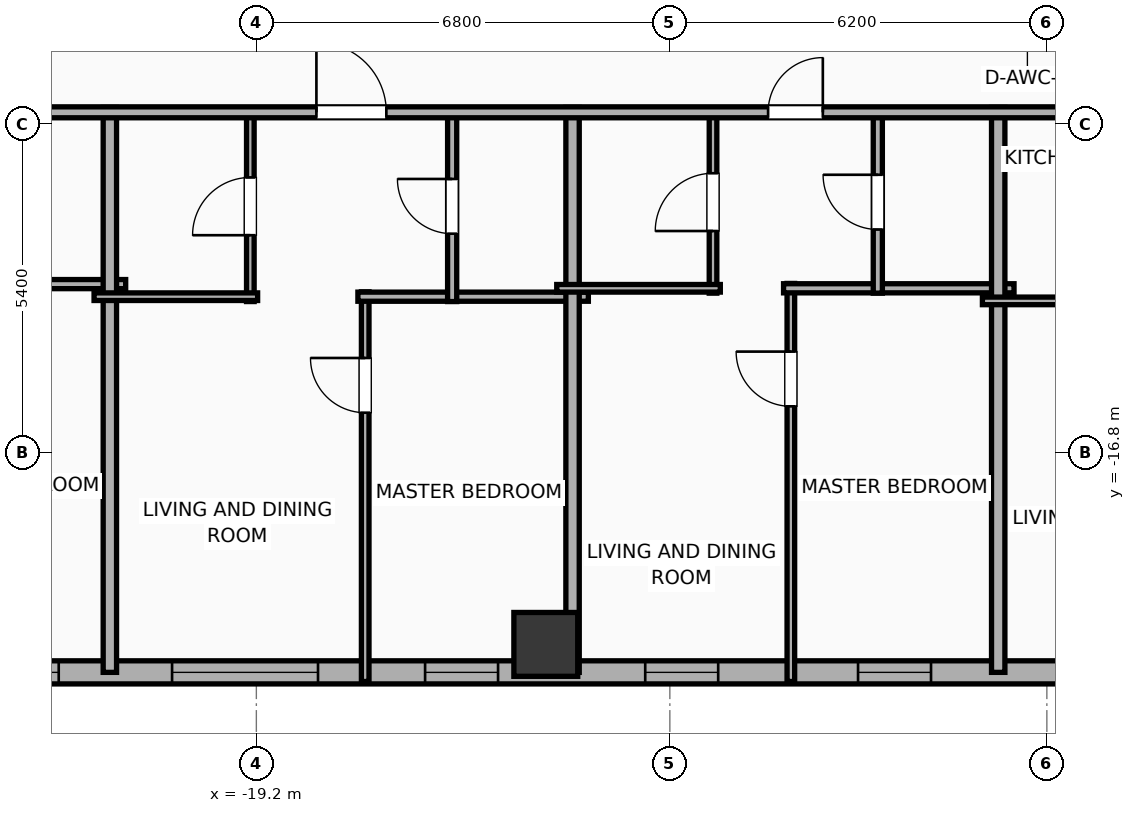
"""IFC4 building model, lengths in metres.
Left out: names, types, materials, properties, quantities, classifications, styles, units other than length and angle.
Written with IfcOpenShell. Run it as: python <this file> out.ifc"""

import sys

from ifc_helpers import new_model, si_unit, direction, frame, frame_2d, origin, origin_2d, place, context, subcontext, project, spatial, rectangle, hollow_rectangle, extrude, element, fill, save


model = new_model("IFC4")
c1 = context("Model", 3, precision=1e-05, world=origin(), true_north=direction((0.0, 1.0)))
c2 = subcontext(c1, "Body", "Model", "MODEL_VIEW")
j1 = project(units=[si_unit("LENGTHUNIT", "METRE"), si_unit("PLANEANGLEUNIT", "RADIAN")], contexts=[c1])
p1 = place(None, origin())
s1 = spatial("IfcSite", under=j1, at=p1, CompositionType="ELEMENT")
p2 = place(p1, origin())
s2 = spatial("IfcBuilding", under=s1, at=p2, CompositionType="ELEMENT")
p3 = place(p2, frame((0.0, 0.0, 120.9)))
s3 = spatial("IfcBuildingStorey", under=s2, at=p3, CompositionType="ELEMENT", Elevation=120.9)
p4 = place(p3, frame((-14.44, -19.95, 0.0), z_axis=(0.0, 0.0, 1.0), x_axis=(1.0, 0.0, 0.0)))
e1 = element("IfcColumn", 1, at=p4, inside=s3, PredefinedType="COLUMN", context=c2, shape_type="SweptSolid", body=[
    extrude(hollow_rectangle(XDim=1.05, YDim=1.05, WallThickness=0.036, at=origin_2d()), origin(), (0.0, 0.0, 1.0), 3.9),
])
p5 = place(p3, frame((29.381, -20.41, 0.0), z_axis=(0.0, 0.0, 1.0), x_axis=(-1.0, 0.0, 0.0)))
e2 = element("IfcWall", 2, at=p5, inside=s3, PredefinedType="ELEMENTEDWALL", context=c2, shape_type="SweptSolid", body=[
    extrude(rectangle(XDim=54.763, YDim=0.38, at=frame_2d((27.381, 0.0))), origin(), (0.0, 0.0, 1.0), 3.65),
])
p6 = place(p5, frame((5.645, 0.0, 0.75)))
e3 = element("IfcOpeningElement", 3, at=p6, cuts=e2, PredefinedType="OPENING", context=c2, shape_type="SweptSolid", body=[
    extrude(rectangle(XDim=2.4, YDim=2.1, at=frame_2d((1.2, 1.05))), frame((0.0, 0.2, 0.0), z_axis=(0.0, -1.0, 0.0), x_axis=(1.0, 0.0, 0.0)), (0.0, 0.0, 1.0), 0.4),
])
p7 = place(p5, frame((47.567, 0.0, 0.75)))
e4 = element("IfcOpeningElement", 4, at=p7, cuts=e2, PredefinedType="OPENING", context=c2, shape_type="SweptSolid", body=[
    extrude(rectangle(XDim=2.4, YDim=2.1, at=frame_2d((1.2, 1.05))), frame((0.0, 0.2, 0.0), z_axis=(0.0, -1.0, 0.0), x_axis=(1.0, 0.0, 0.0)), (0.0, 0.0, 1.0), 0.4),
])
p8 = place(p5, frame((51.831, 0.0, 0.75)))
e5 = element("IfcOpeningElement", 5, at=p8, cuts=e2, PredefinedType="OPENING", context=c2, shape_type="SweptSolid", body=[
    extrude(rectangle(XDim=1.2, YDim=2.05, at=frame_2d((0.6, 1.025))), frame((0.0, 0.2, 0.0), z_axis=(0.0, -1.0, 0.0), x_axis=(1.0, 0.0, 0.0)), (0.0, 0.0, 1.0), 0.4),
])
p9 = place(p5, frame((44.606, 0.0, 0.75)))
e6 = element("IfcOpeningElement", 6, at=p9, cuts=e2, PredefinedType="OPENING", context=c2, shape_type="SweptSolid", body=[
    extrude(rectangle(XDim=1.2, YDim=2.05, at=frame_2d((0.6, 1.025))), frame((0.0, 0.2, 0.0), z_axis=(0.0, -1.0, 0.0), x_axis=(1.0, 0.0, 0.0)), (0.0, 0.0, 1.0), 0.4),
])
p10 = place(p5, frame((40.986, 0.0, 0.75)))
e7 = element("IfcOpeningElement", 7, at=p10, cuts=e2, PredefinedType="OPENING", context=c2, shape_type="SweptSolid", body=[
    extrude(rectangle(XDim=1.2, YDim=2.05, at=frame_2d((0.6, 1.025))), frame((0.0, 0.2, 0.0), z_axis=(0.0, -1.0, 0.0), x_axis=(1.0, 0.0, 0.0)), (0.0, 0.0, 1.0), 0.4),
])
p11 = place(p5, frame((37.486, 0.0, 0.75)))
e8 = element("IfcOpeningElement", 8, at=p11, cuts=e2, PredefinedType="OPENING", context=c2, shape_type="SweptSolid", body=[
    extrude(rectangle(XDim=1.2, YDim=2.05, at=frame_2d((0.6, 1.025))), frame((0.0, 0.2, 0.0), z_axis=(0.0, -1.0, 0.0), x_axis=(1.0, 0.0, 0.0)), (0.0, 0.0, 1.0), 0.4),
])
p12 = place(p5, frame((33.986, 0.0, 0.75)))
e9 = element("IfcOpeningElement", 9, at=p12, cuts=e2, PredefinedType="OPENING", context=c2, shape_type="SweptSolid", body=[
    extrude(rectangle(XDim=1.2, YDim=2.05, at=frame_2d((0.6, 1.025))), frame((0.0, 0.2, 0.0), z_axis=(0.0, -1.0, 0.0), x_axis=(1.0, 0.0, 0.0)), (0.0, 0.0, 1.0), 0.4),
])
p13 = place(p5, frame((30.486, 0.0, 0.75)))
e10 = element("IfcOpeningElement", 10, at=p13, cuts=e2, PredefinedType="OPENING", context=c2, shape_type="SweptSolid", body=[
    extrude(rectangle(XDim=1.2, YDim=2.05, at=frame_2d((0.6, 1.025))), frame((0.0, 0.2, 0.0), z_axis=(0.0, -1.0, 0.0), x_axis=(1.0, 0.0, 0.0)), (0.0, 0.0, 1.0), 0.4),
])
p14 = place(p5, frame((26.986, 0.0, 0.75)))
e11 = element("IfcOpeningElement", 11, at=p14, cuts=e2, PredefinedType="OPENING", context=c2, shape_type="SweptSolid", body=[
    extrude(rectangle(XDim=1.2, YDim=2.05, at=frame_2d((0.6, 1.025))), frame((0.0, 0.2, 0.0), z_axis=(0.0, -1.0, 0.0), x_axis=(1.0, 0.0, 0.0)), (0.0, 0.0, 1.0), 0.4),
])
p15 = place(p5, frame((23.486, 0.0, 0.75)))
e12 = element("IfcOpeningElement", 12, at=p15, cuts=e2, PredefinedType="OPENING", context=c2, shape_type="SweptSolid", body=[
    extrude(rectangle(XDim=1.2, YDim=2.05, at=frame_2d((0.6, 1.025))), frame((0.0, 0.2, 0.0), z_axis=(0.0, -1.0, 0.0), x_axis=(1.0, 0.0, 0.0)), (0.0, 0.0, 1.0), 0.4),
])
p16 = place(p5, frame((19.986, 0.0, 0.75)))
e13 = element("IfcOpeningElement", 13, at=p16, cuts=e2, PredefinedType="OPENING", context=c2, shape_type="SweptSolid", body=[
    extrude(rectangle(XDim=1.2, YDim=2.05, at=frame_2d((0.6, 1.025))), frame((0.0, 0.2, 0.0), z_axis=(0.0, -1.0, 0.0), x_axis=(1.0, 0.0, 0.0)), (0.0, 0.0, 1.0), 0.4),
])
p17 = place(p5, frame((16.486, 0.0, 0.75)))
e14 = element("IfcOpeningElement", 14, at=p17, cuts=e2, PredefinedType="OPENING", context=c2, shape_type="SweptSolid", body=[
    extrude(rectangle(XDim=1.2, YDim=2.05, at=frame_2d((0.6, 1.025))), frame((0.0, 0.2, 0.0), z_axis=(0.0, -1.0, 0.0), x_axis=(1.0, 0.0, 0.0)), (0.0, 0.0, 1.0), 0.4),
])
p18 = place(p5, frame((11.698, 0.0, 0.75)))
e15 = element("IfcOpeningElement", 15, at=p18, cuts=e2, PredefinedType="OPENING", context=c2, shape_type="SweptSolid", body=[
    extrude(rectangle(XDim=1.2, YDim=2.05, at=frame_2d((0.6, 1.025))), frame((0.0, 0.2, 0.0), z_axis=(0.0, -1.0, 0.0), x_axis=(1.0, 0.0, 0.0)), (0.0, 0.0, 1.0), 0.4),
])
p19 = place(p5, frame((3.172, 0.0, 0.75)))
e16 = element("IfcOpeningElement", 16, at=p19, cuts=e2, PredefinedType="OPENING", context=c2, shape_type="SweptSolid", body=[
    extrude(rectangle(XDim=1.2, YDim=2.05, at=frame_2d((0.6, 1.025))), frame((0.0, 0.2, 0.0), z_axis=(0.0, -1.0, 0.0), x_axis=(1.0, 0.0, 0.0)), (0.0, 0.0, 1.0), 0.4),
])
p20 = place(p5, frame((1.13, 0.0, 0.75)))
e17 = element("IfcOpeningElement", 17, at=p20, cuts=e2, PredefinedType="OPENING", context=c2, shape_type="SweptSolid", body=[
    extrude(rectangle(XDim=1.2, YDim=2.05, at=frame_2d((0.6, 1.025))), frame((0.0, 0.2, 0.0), z_axis=(0.0, -1.0, 0.0), x_axis=(1.0, 0.0, 0.0)), (0.0, 0.0, 1.0), 0.4),
])
p21 = place(p3, frame((-25.139, -14.025, 0.0), z_axis=(0.0, 0.0, 1.0), x_axis=(1.0, 0.0, 0.0)))
e18 = element("IfcWall", 18, at=p21, inside=s3, PredefinedType="PLUMBINGWALL", context=c2, shape_type="SweptSolid", body=[
    extrude(rectangle(XDim=3.79, YDim=0.15, at=frame_2d((1.895, 0.0))), origin(), (0.0, 0.0, 1.0), 3.65),
])
p22 = place(p3, frame((-21.609, -20.41, 0.0), z_axis=(0.0, 0.0, 1.0), x_axis=(0.0, 1.0, 0.0)))
e19 = element("IfcWall", 19, at=p22, inside=s3, PredefinedType="PARTITIONING", context=c2, shape_type="SweptSolid", body=[
    extrude(rectangle(XDim=9.29, YDim=0.22, at=frame_2d((4.645, 0.0))), origin(), (0.0, 0.0, 1.0), 3.65),
])
p23 = place(p3, frame((-17.41, -20.56, 0.0), z_axis=(0.0, 0.0, 1.0), x_axis=(0.0, 1.0, 0.0)))
e20 = element("IfcWall", 20, at=p23, inside=s3, PredefinedType="PARTITIONING", context=c2, shape_type="SweptSolid", body=[
    extrude(rectangle(XDim=6.408, YDim=0.125, at=frame_2d((3.204, 0.0))), origin(), (0.0, 0.0, 1.0), 3.65),
])
p24 = place(p23, frame((4.42, 0.0, 0.0)))
e21 = element("IfcOpeningElement", 21, at=p24, cuts=e20, PredefinedType="OPENING", context=c2, shape_type="SweptSolid", body=[
    extrude(rectangle(XDim=0.9, YDim=2.05, at=frame_2d((0.45, 1.025))), frame((0.0, 0.073, 0.0), z_axis=(0.0, -1.0, 0.0), x_axis=(1.0, 0.0, 0.0)), (0.0, 0.0, 1.0), 0.145),
])
p25 = place(p3, frame((-17.53, -14.232, 0.0), z_axis=(0.0, 0.0, 1.0), x_axis=(1.0, 0.0, 0.0)))
e22 = element("IfcWall", 22, at=p25, inside=s3, PredefinedType="PLUMBINGWALL", context=c2, shape_type="SweptSolid", body=[
    extrude(rectangle(XDim=3.79, YDim=0.15, at=frame_2d((1.895, 0.0))), origin(), (0.0, 0.0, 1.0), 3.65),
])
p26 = place(p3, frame((-19.299, -14.312, 0.0), z_axis=(0.0, 0.0, 1.0), x_axis=(0.0, 1.0, 0.0)))
e23 = element("IfcWall", 23, at=p26, inside=s3, PredefinedType="PARTITIONING", context=c2, shape_type="SweptSolid", body=[
    extrude(rectangle(XDim=3.132, YDim=0.125, at=frame_2d((1.566, 0.0))), origin(), (0.0, 0.0, 1.0), 3.65),
])
p27 = place(p26, frame((1.091, 0.0, 0.0)))
e24 = element("IfcOpeningElement", 24, at=p27, cuts=e23, PredefinedType="OPENING", context=c2, shape_type="SweptSolid", body=[
    extrude(rectangle(XDim=0.95, YDim=2.05, at=frame_2d((0.475, 1.025))), frame((0.0, 0.073, 0.0), z_axis=(0.0, -1.0, 0.0), x_axis=(1.0, 0.0, 0.0)), (0.0, 0.0, 1.0), 0.145),
])
p28 = place(p3, frame((-21.869, -14.232, 0.0), z_axis=(0.0, 0.0, 1.0), x_axis=(1.0, 0.0, 0.0)))
e25 = element("IfcWall", 25, at=p28, inside=s3, PredefinedType="PARTITIONING", context=c2, shape_type="SweptSolid", body=[
    extrude(rectangle(XDim=2.69, YDim=0.125, at=frame_2d((1.345, 0.0))), origin(), (0.0, 0.0, 1.0), 3.65),
])
p29 = place(p3, frame((-15.98, -14.312, 0.0), z_axis=(0.0, 0.0, 1.0), x_axis=(0.0, 1.0, 0.0)))
e26 = element("IfcWall", 26, at=p29, inside=s3, PredefinedType="PLUMBINGWALL", context=c2, shape_type="SweptSolid", body=[
    extrude(rectangle(XDim=3.132, YDim=0.15, at=frame_2d((1.566, 0.0))), origin(), (0.0, 0.0, 1.0), 3.65),
])
p30 = place(p29, frame((1.116, 0.0, 0.0)))
e27 = element("IfcOpeningElement", 27, at=p30, cuts=e26, PredefinedType="OPENING", context=c2, shape_type="SweptSolid", body=[
    extrude(rectangle(XDim=0.9, YDim=2.05, at=frame_2d((0.45, 1.025))), frame((0.0, 0.085, 0.0), z_axis=(0.0, -1.0, 0.0), x_axis=(1.0, 0.0, 0.0)), (0.0, 0.0, 1.0), 0.17),
])
p31 = place(p3, frame((-14.0, -20.41, 0.0), z_axis=(0.0, 0.0, 1.0), x_axis=(0.0, 1.0, 0.0)))
e28 = element("IfcWall", 28, at=p31, inside=s3, PredefinedType="PARTITIONING", context=c2, shape_type="SweptSolid", body=[
    extrude(rectangle(XDim=9.29, YDim=0.22, at=frame_2d((4.645, 0.0))), origin(), (0.0, 0.0, 1.0), 3.65),
])
p32 = place(p3, frame((-10.41, -20.56, 0.0), z_axis=(0.0, 0.0, 1.0), x_axis=(0.0, 1.0, 0.0)))
e29 = element("IfcWall", 29, at=p32, inside=s3, PredefinedType="PARTITIONING", context=c2, shape_type="SweptSolid", body=[
    extrude(rectangle(XDim=6.546, YDim=0.125, at=frame_2d((3.273, 0.0))), origin(), (0.0, 0.0, 1.0), 3.65),
])
p33 = place(p32, frame((4.525, 0.0, 0.0)))
e30 = element("IfcOpeningElement", 30, at=p33, cuts=e29, PredefinedType="OPENING", context=c2, shape_type="SweptSolid", body=[
    extrude(rectangle(XDim=0.9, YDim=2.05, at=frame_2d((0.45, 1.025))), frame((0.0, 0.073, 0.0), z_axis=(0.0, -1.0, 0.0), x_axis=(1.0, 0.0, 0.0)), (0.0, 0.0, 1.0), 0.145),
])
p34 = place(p3, frame((-10.53, -14.094, 0.0), z_axis=(0.0, 0.0, 1.0), x_axis=(1.0, 0.0, 0.0)))
e31 = element("IfcWall", 31, at=p34, inside=s3, PredefinedType="PLUMBINGWALL", context=c2, shape_type="SweptSolid", body=[
    extrude(rectangle(XDim=3.79, YDim=0.15, at=frame_2d((1.895, 0.0))), origin(), (0.0, 0.0, 1.0), 3.65),
])
p35 = place(p3, frame((-11.69, -14.174, 0.0), z_axis=(0.0, 0.0, 1.0), x_axis=(0.0, 1.0, 0.0)))
e32 = element("IfcWall", 32, at=p35, inside=s3, PredefinedType="PARTITIONING", context=c2, shape_type="SweptSolid", body=[
    extrude(rectangle(XDim=2.994, YDim=0.125, at=frame_2d((1.497, 0.0))), origin(), (0.0, 0.0, 1.0), 3.65),
])
p36 = place(p35, frame((1.022, 0.0, 0.0)))
e33 = element("IfcOpeningElement", 33, at=p36, cuts=e32, PredefinedType="OPENING", context=c2, shape_type="SweptSolid", body=[
    extrude(rectangle(XDim=0.95, YDim=2.05, at=frame_2d((0.475, 1.025))), frame((0.0, 0.073, 0.0), z_axis=(0.0, -1.0, 0.0), x_axis=(1.0, 0.0, 0.0)), (0.0, 0.0, 1.0), 0.145),
])
p37 = place(p3, frame((-14.26, -14.094, 0.0), z_axis=(0.0, 0.0, 1.0), x_axis=(1.0, 0.0, 0.0)))
e34 = element("IfcWall", 34, at=p37, inside=s3, PredefinedType="PARTITIONING", context=c2, shape_type="SweptSolid", body=[
    extrude(rectangle(XDim=2.69, YDim=0.125, at=frame_2d((1.345, 0.0))), origin(), (0.0, 0.0, 1.0), 3.65),
])
p38 = place(p3, frame((-8.98, -14.174, 0.0), z_axis=(0.0, 0.0, 1.0), x_axis=(0.0, 1.0, 0.0)))
e35 = element("IfcWall", 35, at=p38, inside=s3, PredefinedType="PLUMBINGWALL", context=c2, shape_type="SweptSolid", body=[
    extrude(rectangle(XDim=2.994, YDim=0.15, at=frame_2d((1.497, 0.0))), origin(), (0.0, 0.0, 1.0), 3.65),
])
p39 = place(p38, frame((1.047, 0.0, 0.0)))
e36 = element("IfcOpeningElement", 36, at=p39, cuts=e35, PredefinedType="OPENING", context=c2, shape_type="SweptSolid", body=[
    extrude(rectangle(XDim=0.9, YDim=2.05, at=frame_2d((0.45, 1.025))), frame((0.0, 0.085, 0.0), z_axis=(0.0, -1.0, 0.0), x_axis=(1.0, 0.0, 0.0)), (0.0, 0.0, 1.0), 0.17),
])
p40 = place(p3, frame((-7.0, -20.41, 0.0), z_axis=(0.0, 0.0, 1.0), x_axis=(0.0, 1.0, 0.0)))
e37 = element("IfcWall", 37, at=p40, inside=s3, PredefinedType="PARTITIONING", context=c2, shape_type="SweptSolid", body=[
    extrude(rectangle(XDim=9.29, YDim=0.22, at=frame_2d((4.645, 0.0))), origin(), (0.0, 0.0, 1.0), 3.65),
])
p41 = place(p3, frame((-7.26, -14.301, 0.0), z_axis=(0.0, 0.0, 1.0), x_axis=(1.0, 0.0, 0.0)))
e38 = element("IfcWall", 38, at=p41, inside=s3, PredefinedType="PARTITIONING", context=c2, shape_type="SweptSolid", body=[
    extrude(rectangle(XDim=2.69, YDim=0.125, at=frame_2d((1.345, 0.0))), origin(), (0.0, 0.0, 1.0), 3.65),
])
p42 = place(p3, frame((-29.21, -11.2, 0.0), z_axis=(0.0, 0.0, 1.0), x_axis=(1.0, 0.0, 0.0)))
e39 = element("IfcWall", 39, at=p42, inside=s3, PredefinedType="PARTITIONING", context=c2, shape_type="SweptSolid", body=[
    extrude(rectangle(XDim=62.42, YDim=0.18, at=frame_2d((31.21, 0.0))), origin(), (0.0, 0.0, 1.0), 3.65),
])
p43 = place(p42, frame((3.357, 0.0, 0.0)))
e40 = element("IfcOpeningElement", 40, at=p43, cuts=e39, PredefinedType="OPENING", context=c2, shape_type="SweptSolid", body=[
    extrude(rectangle(XDim=1.15, YDim=2.05, at=frame_2d((0.575, 1.025))), frame((0.0, 0.1, 0.0), z_axis=(0.0, -1.0, 0.0), x_axis=(1.0, 0.0, 0.0)), (0.0, 0.0, 1.0), 0.2),
])
p44 = place(p42, frame((10.998, 0.0, 0.0)))
e41 = element("IfcOpeningElement", 41, at=p44, cuts=e39, PredefinedType="OPENING", context=c2, shape_type="SweptSolid", body=[
    extrude(rectangle(XDim=1.15, YDim=2.05, at=frame_2d((0.575, 1.025))), frame((0.0, 0.1, 0.0), z_axis=(0.0, -1.0, 0.0), x_axis=(1.0, 0.0, 0.0)), (0.0, 0.0, 1.0), 0.2),
])
p45 = place(p42, frame((18.426, 0.0, 0.0)))
e42 = element("IfcOpeningElement", 42, at=p45, cuts=e39, PredefinedType="OPENING", context=c2, shape_type="SweptSolid", body=[
    extrude(rectangle(XDim=0.9, YDim=2.05, at=frame_2d((0.45, 1.025))), frame((0.0, 0.1, 0.0), z_axis=(0.0, -1.0, 0.0), x_axis=(1.0, 0.0, 0.0)), (0.0, 0.0, 1.0), 0.2),
])
p46 = place(p42, frame((25.423, 0.0, 0.0)))
e43 = element("IfcOpeningElement", 43, at=p46, cuts=e39, PredefinedType="OPENING", context=c2, shape_type="SweptSolid", body=[
    extrude(rectangle(XDim=0.9, YDim=2.05, at=frame_2d((0.45, 1.025))), frame((0.0, 0.1, 0.0), z_axis=(0.0, -1.0, 0.0), x_axis=(1.0, 0.0, 0.0)), (0.0, 0.0, 1.0), 0.2),
])
p47 = place(p42, frame((32.427, 0.0, 0.0)))
e44 = element("IfcOpeningElement", 44, at=p47, cuts=e39, PredefinedType="OPENING", context=c2, shape_type="SweptSolid", body=[
    extrude(rectangle(XDim=0.9, YDim=2.05, at=frame_2d((0.45, 1.025))), frame((0.0, 0.1, 0.0), z_axis=(0.0, -1.0, 0.0), x_axis=(1.0, 0.0, 0.0)), (0.0, 0.0, 1.0), 0.2),
])
p48 = place(p42, frame((39.424, 0.0, 0.0)))
e45 = element("IfcOpeningElement", 45, at=p48, cuts=e39, PredefinedType="OPENING", context=c2, shape_type="SweptSolid", body=[
    extrude(rectangle(XDim=0.9, YDim=2.05, at=frame_2d((0.45, 1.025))), frame((0.0, 0.1, 0.0), z_axis=(0.0, -1.0, 0.0), x_axis=(1.0, 0.0, 0.0)), (0.0, 0.0, 1.0), 0.2),
])
p49 = place(p42, frame((46.09, 0.0, 0.0)))
e46 = element("IfcOpeningElement", 46, at=p49, cuts=e39, PredefinedType="OPENING", context=c2, shape_type="SweptSolid", body=[
    extrude(rectangle(XDim=0.9, YDim=2.05, at=frame_2d((0.45, 1.025))), frame((0.0, 0.1, 0.0), z_axis=(0.0, -1.0, 0.0), x_axis=(1.0, 0.0, 0.0)), (0.0, 0.0, 1.0), 0.2),
])
p50 = place(p42, frame((51.071, 0.0, 0.0)))
e47 = element("IfcOpeningElement", 47, at=p50, cuts=e39, PredefinedType="OPENING", context=c2, shape_type="SweptSolid", body=[
    extrude(rectangle(XDim=1.15, YDim=2.05, at=frame_2d((0.575, 1.025))), frame((0.0, 0.1, 0.0), z_axis=(0.0, -1.0, 0.0), x_axis=(1.0, 0.0, 0.0)), (0.0, 0.0, 1.0), 0.2),
])
p51 = place(p42, frame((58.93, 0.0, 0.0)))
e48 = element("IfcOpeningElement", 48, at=p51, cuts=e39, PredefinedType="OPENING", context=c2, shape_type="SweptSolid", body=[
    extrude(rectangle(XDim=0.9, YDim=2.05, at=frame_2d((0.45, 1.025))), frame((0.0, 0.1, 0.0), z_axis=(0.0, -1.0, 0.0), x_axis=(1.0, 0.0, 0.0)), (0.0, 0.0, 1.0), 0.2),
])
p52 = place(p7, origin())
e49 = element("IfcWindow", 49, at=p52, inside=s3, PartitioningType="SINGLE_PANEL", PredefinedType="WINDOW", context=c2, shape_type="SweptSolid", body=[
    extrude(rectangle(XDim=2.4, YDim=2.1, at=frame_2d((1.2, 1.05))), frame((0.0, 0.03, 0.0), z_axis=(0.0, -1.0, 0.0), x_axis=(1.0, 0.0, 0.0)), (0.0, 0.0, 1.0), 0.06),
])
fill(e4, e49)
p53 = place(p8, origin())
e50 = element("IfcWindow", 50, at=p53, inside=s3, PartitioningType="SINGLE_PANEL", PredefinedType="WINDOW", context=c2, shape_type="SweptSolid", body=[
    extrude(rectangle(XDim=1.2, YDim=2.05, at=frame_2d((0.6, 1.025))), frame((0.0, 0.03, 0.0), z_axis=(0.0, -1.0, 0.0), x_axis=(1.0, 0.0, 0.0)), (0.0, 0.0, 1.0), 0.06),
])
fill(e5, e50)
p54 = place(p9, origin())
e51 = element("IfcWindow", 51, at=p54, inside=s3, PartitioningType="SINGLE_PANEL", PredefinedType="WINDOW", context=c2, shape_type="SweptSolid", body=[
    extrude(rectangle(XDim=1.2, YDim=2.05, at=frame_2d((0.6, 1.025))), frame((0.0, 0.03, 0.0), z_axis=(0.0, -1.0, 0.0), x_axis=(1.0, 0.0, 0.0)), (0.0, 0.0, 1.0), 0.06),
])
fill(e6, e51)
p55 = place(p10, origin())
e52 = element("IfcWindow", 52, at=p55, inside=s3, PartitioningType="SINGLE_PANEL", PredefinedType="WINDOW", context=c2, shape_type="SweptSolid", body=[
    extrude(rectangle(XDim=1.2, YDim=2.05, at=frame_2d((0.6, 1.025))), frame((0.0, 0.03, 0.0), z_axis=(0.0, -1.0, 0.0), x_axis=(1.0, 0.0, 0.0)), (0.0, 0.0, 1.0), 0.06),
])
fill(e7, e52)
p56 = place(p11, origin())
e53 = element("IfcWindow", 53, at=p56, inside=s3, PartitioningType="SINGLE_PANEL", PredefinedType="WINDOW", context=c2, shape_type="SweptSolid", body=[
    extrude(rectangle(XDim=1.2, YDim=2.05, at=frame_2d((0.6, 1.025))), frame((0.0, 0.03, 0.0), z_axis=(0.0, -1.0, 0.0), x_axis=(1.0, 0.0, 0.0)), (0.0, 0.0, 1.0), 0.06),
])
fill(e8, e53)
p57 = place(p24, origin())
e54 = element("IfcDoor", 54, at=p57, inside=s3, OperationType="SINGLE_SWING_RIGHT", PredefinedType="DOOR", context=c2, shape_type="SweptSolid", body=[
    extrude(rectangle(XDim=0.9, YDim=2.05, at=frame_2d((0.45, 1.025))), frame((0.0, 0.025, 0.0), z_axis=(0.0, -1.0, 0.0), x_axis=(1.0, 0.0, 0.0)), (0.0, 0.0, 1.0), 0.05),
])
fill(e21, e54)
p58 = place(p27, origin())
e55 = element("IfcDoor", 55, at=p58, inside=s3, OperationType="SINGLE_SWING_LEFT", PredefinedType="DOOR", context=c2, shape_type="SweptSolid", body=[
    extrude(rectangle(XDim=0.95, YDim=2.05, at=frame_2d((0.475, 1.025))), frame((0.0, 0.025, 0.0), z_axis=(0.0, -1.0, 0.0), x_axis=(1.0, 0.0, 0.0)), (0.0, 0.0, 1.0), 0.05),
])
fill(e24, e55)
p59 = place(p30, origin())
e56 = element("IfcDoor", 56, at=p59, inside=s3, OperationType="SINGLE_SWING_RIGHT", PredefinedType="DOOR", context=c2, shape_type="SweptSolid", body=[
    extrude(rectangle(XDim=0.9, YDim=2.05, at=frame_2d((0.45, 1.025))), frame((0.0, 0.025, 0.0), z_axis=(0.0, -1.0, 0.0), x_axis=(1.0, 0.0, 0.0)), (0.0, 0.0, 1.0), 0.05),
])
fill(e27, e56)
p60 = place(p33, origin())
e57 = element("IfcDoor", 57, at=p60, inside=s3, OperationType="SINGLE_SWING_RIGHT", PredefinedType="DOOR", context=c2, shape_type="SweptSolid", body=[
    extrude(rectangle(XDim=0.9, YDim=2.05, at=frame_2d((0.45, 1.025))), frame((0.0, 0.025, 0.0), z_axis=(0.0, -1.0, 0.0), x_axis=(1.0, 0.0, 0.0)), (0.0, 0.0, 1.0), 0.05),
])
fill(e30, e57)
p61 = place(p36, origin())
e58 = element("IfcDoor", 58, at=p61, inside=s3, OperationType="SINGLE_SWING_LEFT", PredefinedType="DOOR", context=c2, shape_type="SweptSolid", body=[
    extrude(rectangle(XDim=0.95, YDim=2.05, at=frame_2d((0.475, 1.025))), frame((0.0, 0.025, 0.0), z_axis=(0.0, -1.0, 0.0), x_axis=(1.0, 0.0, 0.0)), (0.0, 0.0, 1.0), 0.05),
])
fill(e33, e58)
p62 = place(p39, origin())
e59 = element("IfcDoor", 59, at=p62, inside=s3, OperationType="SINGLE_SWING_RIGHT", PredefinedType="DOOR", context=c2, shape_type="SweptSolid", body=[
    extrude(rectangle(XDim=0.9, YDim=2.05, at=frame_2d((0.45, 1.025))), frame((0.0, 0.025, 0.0), z_axis=(0.0, -1.0, 0.0), x_axis=(1.0, 0.0, 0.0)), (0.0, 0.0, 1.0), 0.05),
])
fill(e36, e59)
p63 = place(p44, origin())
e60 = element("IfcDoor", 60, at=p63, inside=s3, OperationType="SINGLE_SWING_LEFT", PredefinedType="DOOR", context=c2, shape_type="SweptSolid", body=[
    extrude(rectangle(XDim=1.15, YDim=2.05, at=frame_2d((0.575, 1.025))), frame((0.0, 0.025, 0.0), z_axis=(0.0, -1.0, 0.0), x_axis=(1.0, 0.0, 0.0)), (0.0, 0.0, 1.0), 0.05),
])
fill(e41, e60)
p64 = place(p45, origin())
e61 = element("IfcDoor", 61, at=p64, inside=s3, OperationType="SINGLE_SWING_RIGHT", PredefinedType="DOOR", context=c2, shape_type="SweptSolid", body=[
    extrude(rectangle(XDim=0.9, YDim=2.05, at=frame_2d((0.45, 1.025))), frame((0.0, 0.025, 0.0), z_axis=(0.0, -1.0, 0.0), x_axis=(1.0, 0.0, 0.0)), (0.0, 0.0, 1.0), 0.05),
])
fill(e42, e61)
save(model, sys.argv[1])
